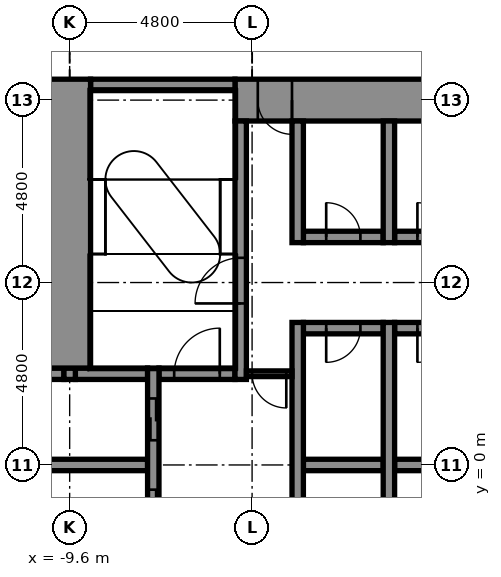
"""IFC4 building model, lengths in metres.
Left out: names, types, materials, properties, quantities, classifications, styles, units other than length and angle.
Written with IfcOpenShell. Run it as: python <this file> out.ifc"""

import sys

from ifc_helpers import new_model, si_unit, direction, frame, frame_2d, origin, place, context, subcontext, project, spatial, rectangle, extrude, element, fill, save


model = new_model("IFC4")
c1 = context("Model", 3, precision=1e-05, world=origin(), true_north=direction((0.0, 1.0)))
c2 = subcontext(c1, "Body", "Model", "MODEL_VIEW")
j1 = project(units=[si_unit("LENGTHUNIT", "METRE"), si_unit("PLANEANGLEUNIT", "RADIAN")], contexts=[c1])
p1 = place(None, origin())
s1 = spatial("IfcSite", under=j1, at=p1, CompositionType="ELEMENT")
p2 = place(p1, origin())
s2 = spatial("IfcBuilding", under=s1, at=p2, CompositionType="ELEMENT")
p3 = place(p2, frame((0.0, 0.0, 60.9)))
s3 = spatial("IfcBuildingStorey", under=s2, at=p3, CompositionType="ELEMENT", Elevation=60.9)
p4 = place(p3, frame((-10.85, 0.0, -0.25), z_axis=(0.0, 0.0, 1.0), x_axis=(1.0, 0.0, 0.0)))
e1 = element("IfcWall", 1, at=p4, inside=s3, PredefinedType="STANDARD", context=c2, shape_type="SweptSolid", body=[
    extrude(rectangle(XDim=3.3, YDim=0.3, at=frame_2d((1.65, 0.0))), origin(), (0.0, 0.0, 1.0), 5.45),
])
p5 = place(p3, frame((-3.45, 0.0, -0.25), z_axis=(0.0, 0.0, 1.0), x_axis=(1.0, 0.0, 0.0)))
e2 = element("IfcWall", 2, at=p5, inside=s3, PredefinedType="STANDARD", context=c2, shape_type="SweptSolid", body=[
    extrude(rectangle(XDim=2.1, YDim=0.3, at=frame_2d((1.05, 0.0))), origin(), (0.0, 0.0, 1.0), 5.45),
])
p6 = place(p3, frame((-1.05, 0.0, -0.25), z_axis=(0.0, 0.0, 1.0), x_axis=(1.0, 0.0, 0.0)))
e3 = element("IfcWall", 3, at=p6, inside=s3, PredefinedType="STANDARD", context=c2, shape_type="SweptSolid", body=[
    extrude(rectangle(XDim=2.1, YDim=0.3, at=frame_2d((1.05, 0.0))), origin(), (0.0, 0.0, 1.0), 5.45),
])
p7 = place(p3, frame((-10.85, 2.4, -0.25), z_axis=(0.0, 0.0, 1.0), x_axis=(1.0, 0.0, 0.0)))
e4 = element("IfcWall", 4, at=p7, inside=s3, PredefinedType="STANDARD", context=c2, shape_type="SweptSolid", body=[
    extrude(rectangle(XDim=1.1, YDim=0.3, at=frame_2d((0.55, 0.0))), origin(), (0.0, 0.0, 1.0), 5.45),
])
p8 = place(p3, frame((-9.45, 2.4, -0.25), z_axis=(0.0, 0.0, 1.0), x_axis=(1.0, 0.0, 0.0)))
e5 = element("IfcWall", 5, at=p8, inside=s3, PredefinedType="STANDARD", context=c2, shape_type="SweptSolid", body=[
    extrude(rectangle(XDim=1.9, YDim=0.3, at=frame_2d((0.95, 0.0))), origin(), (0.0, 0.0, 1.0), 5.45),
])
p9 = place(p3, frame((-7.25, 2.4, -0.25), z_axis=(0.0, 0.0, 1.0), x_axis=(1.0, 0.0, 0.0)))
e6 = element("IfcWall", 6, at=p9, inside=s3, PredefinedType="STANDARD", context=c2, shape_type="SweptSolid", body=[
    extrude(rectangle(XDim=2.0, YDim=0.3, at=frame_2d((1.0, 0.0))), origin(), (0.0, 0.0, 1.0), 5.45),
])
p10 = place(p9, frame((0.4, 0.0, 0.25)))
e7 = element("IfcOpeningElement", 7, at=p10, cuts=e6, PredefinedType="OPENING", context=c2, shape_type="SweptSolid", body=[
    extrude(rectangle(XDim=1.2, YDim=2.1, at=frame_2d((0.6, 1.05))), frame((0.0, 0.16, 0.0), z_axis=(0.0, -1.0, 0.0), x_axis=(1.0, 0.0, 0.0)), (0.0, 0.0, 1.0), 0.32),
])
p11 = place(p3, frame((-3.45, 3.6, -0.25), z_axis=(0.0, 0.0, 1.0), x_axis=(1.0, 0.0, 0.0)))
e8 = element("IfcWall", 8, at=p11, inside=s3, PredefinedType="STANDARD", context=c2, shape_type="SweptSolid", body=[
    extrude(rectangle(XDim=2.1, YDim=0.3, at=frame_2d((1.05, 0.0))), origin(), (0.0, 0.0, 1.0), 5.45),
])
p12 = place(p11, frame((0.6, 0.0, 0.25)))
e9 = element("IfcOpeningElement", 9, at=p12, cuts=e8, PredefinedType="OPENING", context=c2, shape_type="SweptSolid", body=[
    extrude(rectangle(XDim=0.9, YDim=2.1, at=frame_2d((0.45, 1.05))), frame((0.0, 0.16, 0.0), z_axis=(0.0, -1.0, 0.0), x_axis=(1.0, 0.0, 0.0)), (0.0, 0.0, 1.0), 0.32),
])
p13 = place(p3, frame((-1.05, 3.6, -0.25), z_axis=(0.0, 0.0, 1.0), x_axis=(1.0, 0.0, 0.0)))
e10 = element("IfcWall", 10, at=p13, inside=s3, PredefinedType="STANDARD", context=c2, shape_type="SweptSolid", body=[
    extrude(rectangle(XDim=2.1, YDim=0.3, at=frame_2d((1.05, 0.0))), origin(), (0.0, 0.0, 1.0), 5.45),
])
p14 = place(p13, frame((0.6, 0.0, 0.25)))
e11 = element("IfcOpeningElement", 11, at=p14, cuts=e10, PredefinedType="OPENING", context=c2, shape_type="SweptSolid", body=[
    extrude(rectangle(XDim=0.9, YDim=2.1, at=frame_2d((0.45, 1.05))), frame((0.0, 0.16, 0.0), z_axis=(0.0, -1.0, 0.0), x_axis=(1.0, 0.0, 0.0)), (0.0, 0.0, 1.0), 0.32),
])
p15 = place(p3, frame((-3.45, 6.0, -0.25), z_axis=(0.0, 0.0, 1.0), x_axis=(1.0, 0.0, 0.0)))
e12 = element("IfcWall", 12, at=p15, inside=s3, PredefinedType="STANDARD", context=c2, shape_type="SweptSolid", body=[
    extrude(rectangle(XDim=2.1, YDim=0.3, at=frame_2d((1.05, 0.0))), origin(), (0.0, 0.0, 1.0), 5.45),
])
p16 = place(p15, frame((0.6, 0.0, 0.25)))
e13 = element("IfcOpeningElement", 13, at=p16, cuts=e12, PredefinedType="OPENING", context=c2, shape_type="SweptSolid", body=[
    extrude(rectangle(XDim=0.9, YDim=2.1, at=frame_2d((0.45, 1.05))), frame((0.0, 0.16, 0.0), z_axis=(0.0, -1.0, 0.0), x_axis=(1.0, 0.0, 0.0)), (0.0, 0.0, 1.0), 0.32),
])
p17 = place(p3, frame((-1.05, 6.0, -0.25), z_axis=(0.0, 0.0, 1.0), x_axis=(1.0, 0.0, 0.0)))
e14 = element("IfcWall", 14, at=p17, inside=s3, PredefinedType="STANDARD", context=c2, shape_type="SweptSolid", body=[
    extrude(rectangle(XDim=2.1, YDim=0.3, at=frame_2d((1.05, 0.0))), origin(), (0.0, 0.0, 1.0), 5.45),
])
p18 = place(p17, frame((0.6, 0.0, 0.25)))
e15 = element("IfcOpeningElement", 15, at=p18, cuts=e14, PredefinedType="OPENING", context=c2, shape_type="SweptSolid", body=[
    extrude(rectangle(XDim=0.9, YDim=2.1, at=frame_2d((0.45, 1.05))), frame((0.0, 0.16, 0.0), z_axis=(0.0, -1.0, 0.0), x_axis=(1.0, 0.0, 0.0)), (0.0, 0.0, 1.0), 0.32),
])
p19 = place(p3, frame((-5.25, 9.6, -0.25), z_axis=(0.0, 0.0, 1.0), x_axis=(1.0, 0.0, 0.0)))
e16 = element("IfcWall", 16, at=p19, inside=s3, PredefinedType="SHEAR", context=c2, shape_type="SweptSolid", body=[
    extrude(rectangle(XDim=14.3, YDim=1.1, at=frame_2d((7.15, 0.0))), origin(), (0.0, 0.0, 1.0), 5.45),
])
p20 = place(p19, frame((0.6, 0.0, 0.25)))
e17 = element("IfcOpeningElement", 17, at=p20, cuts=e16, PredefinedType="OPENING", context=c2, shape_type="SweptSolid", body=[
    extrude(rectangle(XDim=0.9, YDim=2.1, at=frame_2d((0.45, 1.05))), frame((0.0, 0.56, 0.0), z_axis=(0.0, -1.0, 0.0), x_axis=(1.0, 0.0, 0.0)), (0.0, 0.0, 1.0), 1.12),
])
p21 = place(p3, frame((-9.05, 10.0, -0.25), z_axis=(0.0, 0.0, 1.0), x_axis=(1.0, 0.0, 0.0)))
e18 = element("IfcWall", 18, at=p21, inside=s3, PredefinedType="STANDARD", context=c2, shape_type="SweptSolid", body=[
    extrude(rectangle(XDim=3.8, YDim=0.3, at=frame_2d((1.9, 0.0))), origin(), (0.0, 0.0, 1.0), 5.45),
])
p22 = place(p3, frame((-9.6, 2.25, -0.25), z_axis=(0.0, 0.0, 1.0), x_axis=(0.0, 1.0, 0.0)))
e19 = element("IfcWall", 19, at=p22, inside=s3, PredefinedType="STANDARD", context=c2, shape_type="SweptSolid", body=[
    extrude(rectangle(XDim=0.3, YDim=0.3, at=frame_2d((0.15, 0.0))), origin(), (0.0, 0.0, 1.0), 5.45),
])
p23 = place(p3, frame((-9.6, 2.55, -0.25), z_axis=(0.0, 0.0, 1.0), x_axis=(0.0, 1.0, 0.0)))
e20 = element("IfcWall", 20, at=p23, inside=s3, PredefinedType="SHEAR", context=c2, shape_type="SweptSolid", body=[
    extrude(rectangle(XDim=7.6, YDim=1.1, at=frame_2d((3.8, 0.0))), origin(), (0.0, 0.0, 1.0), 5.45),
])
p24 = place(p3, frame((-7.4, -2.55, -0.25), z_axis=(0.0, 0.0, 1.0), x_axis=(0.0, 1.0, 0.0)))
e21 = element("IfcWall", 21, at=p24, inside=s3, PredefinedType="STANDARD", context=c2, shape_type="SweptSolid", body=[
    extrude(rectangle(XDim=5.1, YDim=0.3, at=frame_2d((2.55, 0.0))), origin(), (0.0, 0.0, 1.0), 5.45),
])
p25 = place(p24, frame((0.8, 0.0, 0.25)))
e22 = element("IfcOpeningElement", 22, at=p25, cuts=e21, PredefinedType="OPENING", context=c2, shape_type="SweptSolid", body=[
    extrude(rectangle(XDim=1.1, YDim=2.1, at=frame_2d((0.55, 1.05))), frame((0.0, 0.16, 0.0), z_axis=(0.0, -1.0, 0.0), x_axis=(1.0, 0.0, 0.0)), (0.0, 0.0, 1.0), 0.32),
])
p26 = place(p24, frame((3.2, 0.0, 0.25)))
e23 = element("IfcOpeningElement", 23, at=p26, cuts=e21, PredefinedType="OPENING", context=c2, shape_type="SweptSolid", body=[
    extrude(rectangle(XDim=1.1, YDim=2.1, at=frame_2d((0.55, 1.05))), frame((0.0, 0.16, 0.0), z_axis=(0.0, -1.0, 0.0), x_axis=(1.0, 0.0, 0.0)), (0.0, 0.0, 1.0), 0.32),
])
p27 = place(p3, frame((-5.1, 2.25, -0.25), z_axis=(0.0, 0.0, 1.0), x_axis=(0.0, 1.0, 0.0)))
e24 = element("IfcWall", 24, at=p27, inside=s3, PredefinedType="STANDARD", context=c2, shape_type="SweptSolid", body=[
    extrude(rectangle(XDim=6.8, YDim=0.3, at=frame_2d((3.4, 0.0))), origin(), (0.0, 0.0, 1.0), 5.45),
])
p28 = place(p27, frame((2.0, 0.0, 0.25)))
e25 = element("IfcOpeningElement", 25, at=p28, cuts=e24, PredefinedType="OPENING", context=c2, shape_type="SweptSolid", body=[
    extrude(rectangle(XDim=1.2, YDim=2.1, at=frame_2d((0.6, 1.05))), frame((0.0, 0.16, 0.0), z_axis=(0.0, -1.0, 0.0), x_axis=(1.0, 0.0, 0.0)), (0.0, 0.0, 1.0), 0.32),
])
p29 = place(p3, frame((-3.6, -3.75, -0.25), z_axis=(0.0, 0.0, 1.0), x_axis=(0.0, 1.0, 0.0)))
e26 = element("IfcWall", 26, at=p29, inside=s3, PredefinedType="STANDARD", context=c2, shape_type="SweptSolid", body=[
    extrude(rectangle(XDim=7.5, YDim=0.3, at=frame_2d((3.75, 0.0))), origin(), (0.0, 0.0, 1.0), 5.45),
])
p30 = place(p3, frame((-3.6, 5.85, -0.25), z_axis=(0.0, 0.0, 1.0), x_axis=(0.0, 1.0, 0.0)))
e27 = element("IfcWall", 27, at=p30, inside=s3, PredefinedType="STANDARD", context=c2, shape_type="SweptSolid", body=[
    extrude(rectangle(XDim=3.2, YDim=0.3, at=frame_2d((1.6, 0.0))), origin(), (0.0, 0.0, 1.0), 5.45),
])
p31 = place(p3, frame((-1.2, -3.75, -0.25), z_axis=(0.0, 0.0, 1.0), x_axis=(0.0, 1.0, 0.0)))
e28 = element("IfcWall", 28, at=p31, inside=s3, PredefinedType="STANDARD", context=c2, shape_type="SweptSolid", body=[
    extrude(rectangle(XDim=7.5, YDim=0.3, at=frame_2d((3.75, 0.0))), origin(), (0.0, 0.0, 1.0), 5.45),
])
p32 = place(p3, frame((-1.2, 5.85, -0.25), z_axis=(0.0, 0.0, 1.0), x_axis=(0.0, 1.0, 0.0)))
e29 = element("IfcWall", 29, at=p32, inside=s3, PredefinedType="STANDARD", context=c2, shape_type="SweptSolid", body=[
    extrude(rectangle(XDim=3.2, YDim=0.3, at=frame_2d((1.6, 0.0))), origin(), (0.0, 0.0, 1.0), 5.45),
])
p33 = place(p3, frame((-4.95, 2.4, 0.0), z_axis=(0.0, 0.0, 1.0), x_axis=(1.0, 0.0, 0.0)))
e30 = element("IfcWall", 30, at=p33, inside=s3, PredefinedType="PARTITIONING", context=c2, shape_type="SweptSolid", body=[
    extrude(rectangle(XDim=1.2, YDim=0.15, at=frame_2d((0.6, 0.0))), origin(), (0.0, 0.0, 1.0), 5.2),
])
p34 = place(p33, frame((0.15, 0.0, 0.0)))
e31 = element("IfcOpeningElement", 31, at=p34, cuts=e30, PredefinedType="OPENING", context=c2, shape_type="SweptSolid", body=[
    extrude(rectangle(XDim=0.9, YDim=2.1, at=frame_2d((0.45, 1.05))), frame((0.0, 0.085, 0.0), z_axis=(0.0, -1.0, 0.0), x_axis=(1.0, 0.0, 0.0)), (0.0, 0.0, 1.0), 0.17),
])
p35 = place(p25, origin())
e32 = element("IfcDoor", 32, at=p35, inside=s3, OperationType="DOUBLE_DOOR_SLIDING", PredefinedType="DOOR", context=c2, shape_type="SweptSolid", body=[
    extrude(rectangle(XDim=1.1, YDim=2.1, at=frame_2d((0.55, 1.05))), frame((0.0, 0.025, 0.0), z_axis=(0.0, -1.0, 0.0), x_axis=(1.0, 0.0, 0.0)), (0.0, 0.0, 1.0), 0.05),
])
fill(e22, e32)
p36 = place(p26, origin())
e33 = element("IfcDoor", 33, at=p36, inside=s3, OperationType="DOUBLE_DOOR_SLIDING", PredefinedType="DOOR", context=c2, shape_type="SweptSolid", body=[
    extrude(rectangle(XDim=1.1, YDim=2.1, at=frame_2d((0.55, 1.05))), frame((0.0, 0.025, 0.0), z_axis=(0.0, -1.0, 0.0), x_axis=(1.0, 0.0, 0.0)), (0.0, 0.0, 1.0), 0.05),
])
fill(e23, e33)
p37 = place(p28, origin())
e34 = element("IfcDoor", 34, at=p37, inside=s3, OperationType="SINGLE_SWING_LEFT", PredefinedType="DOOR", context=c2, shape_type="SweptSolid", body=[
    extrude(rectangle(XDim=1.2, YDim=2.1, at=frame_2d((0.6, 1.05))), frame((0.0, 0.025, 0.0), z_axis=(0.0, -1.0, 0.0), x_axis=(1.0, 0.0, 0.0)), (0.0, 0.0, 1.0), 0.05),
])
fill(e25, e34)
p38 = place(p16, origin())
e35 = element("IfcDoor", 35, at=p38, inside=s3, OperationType="SINGLE_SWING_LEFT", PredefinedType="DOOR", context=c2, shape_type="SweptSolid", body=[
    extrude(rectangle(XDim=0.9, YDim=2.1, at=frame_2d((0.45, 1.05))), frame((0.0, 0.025, 0.0), z_axis=(0.0, -1.0, 0.0), x_axis=(1.0, 0.0, 0.0)), (0.0, 0.0, 1.0), 0.05),
])
fill(e13, e35)
p39 = place(p18, origin())
e36 = element("IfcDoor", 36, at=p39, inside=s3, OperationType="SINGLE_SWING_LEFT", PredefinedType="DOOR", context=c2, shape_type="SweptSolid", body=[
    extrude(rectangle(XDim=0.9, YDim=2.1, at=frame_2d((0.45, 1.05))), frame((0.0, 0.025, 0.0), z_axis=(0.0, -1.0, 0.0), x_axis=(1.0, 0.0, 0.0)), (0.0, 0.0, 1.0), 0.05),
])
fill(e15, e36)
p40 = place(p12, frame((0.9, 0.0, 0.0), z_axis=(0.0, 0.0, 1.0), x_axis=(-1.0, 0.0, 0.0)))
e37 = element("IfcDoor", 37, at=p40, inside=s3, OperationType="SINGLE_SWING_LEFT", PredefinedType="DOOR", context=c2, shape_type="SweptSolid", body=[
    extrude(rectangle(XDim=0.9, YDim=2.1, at=frame_2d((0.45, 1.05))), frame((0.0, 0.025, 0.0), z_axis=(0.0, -1.0, 0.0), x_axis=(1.0, 0.0, 0.0)), (0.0, 0.0, 1.0), 0.05),
])
fill(e9, e37)
p41 = place(p14, frame((0.9, 0.0, 0.0), z_axis=(0.0, 0.0, 1.0), x_axis=(-1.0, 0.0, 0.0)))
e38 = element("IfcDoor", 38, at=p41, inside=s3, OperationType="SINGLE_SWING_LEFT", PredefinedType="DOOR", context=c2, shape_type="SweptSolid", body=[
    extrude(rectangle(XDim=0.9, YDim=2.1, at=frame_2d((0.45, 1.05))), frame((0.0, 0.025, 0.0), z_axis=(0.0, -1.0, 0.0), x_axis=(1.0, 0.0, 0.0)), (0.0, 0.0, 1.0), 0.05),
])
fill(e11, e38)
p42 = place(p20, frame((0.9, 0.0, 0.0), z_axis=(0.0, 0.0, 1.0), x_axis=(-1.0, 0.0, 0.0)))
e39 = element("IfcDoor", 39, at=p42, inside=s3, OperationType="SINGLE_SWING_RIGHT", PredefinedType="DOOR", context=c2, shape_type="SweptSolid", body=[
    extrude(rectangle(XDim=0.9, YDim=2.1, at=frame_2d((0.45, 1.05))), frame((0.0, 0.025, 0.0), z_axis=(0.0, -1.0, 0.0), x_axis=(1.0, 0.0, 0.0)), (0.0, 0.0, 1.0), 0.05),
])
fill(e17, e39)
p43 = place(p34, frame((0.9, 0.0, 0.0), z_axis=(0.0, 0.0, 1.0), x_axis=(-1.0, 0.0, 0.0)))
e40 = element("IfcDoor", 40, at=p43, inside=s3, OperationType="SINGLE_SWING_RIGHT", PredefinedType="DOOR", context=c2, shape_type="SweptSolid", body=[
    extrude(rectangle(XDim=0.9, YDim=2.1, at=frame_2d((0.45, 1.05))), frame((0.0, 0.025, 0.0), z_axis=(0.0, -1.0, 0.0), x_axis=(1.0, 0.0, 0.0)), (0.0, 0.0, 1.0), 0.05),
])
fill(e31, e40)
p44 = place(p10, origin())
e41 = element("IfcDoor", 41, at=p44, inside=s3, OperationType="SINGLE_SWING_RIGHT", PredefinedType="DOOR", context=c2, shape_type="SweptSolid", body=[
    extrude(rectangle(XDim=1.2, YDim=2.1, at=frame_2d((0.6, 1.05))), frame((0.0, 0.025, 0.0), z_axis=(0.0, -1.0, 0.0), x_axis=(1.0, 0.0, 0.0)), (0.0, 0.0, 1.0), 0.05),
])
fill(e7, e41)
save(model, sys.argv[1])
